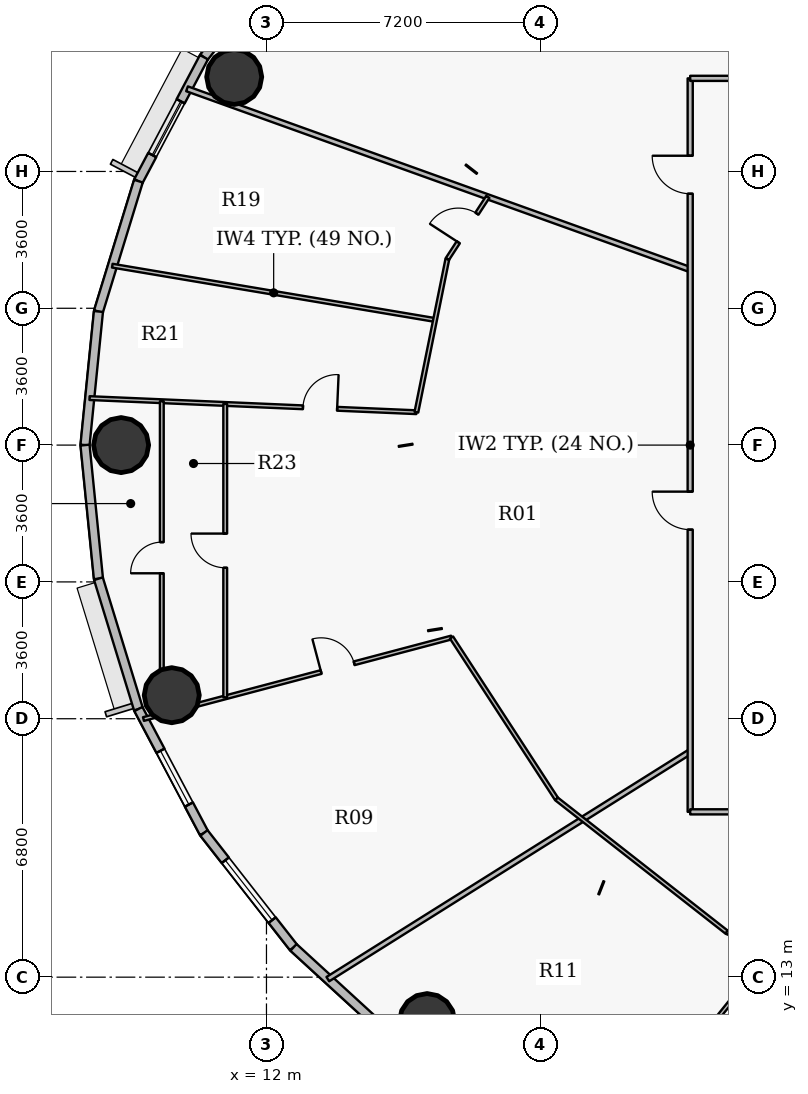
"""IFC4 building model, lengths in metres.
Left out: names, types, materials, properties, quantities, classifications, styles, units other than length and angle.
Written with IfcOpenShell. Run it as: python <this file> out.ifc"""

import sys

from ifc_helpers import new_model, si_unit, direction, frame, frame_2d, origin, origin_2d, place, context, subcontext, project, spatial, rectangle, hollow_circle, extrude, source, transform, mapped, element, fill, save


model = new_model("IFC4")
c1 = context("Model", 3, precision=1e-05, world=origin(), true_north=direction((0.0, 1.0)))
c2 = subcontext(c1, "Body", "Model", "MODEL_VIEW")
j1 = project(units=[si_unit("LENGTHUNIT", "METRE"), si_unit("PLANEANGLEUNIT", "RADIAN")], contexts=[c1])
p1 = place(None, origin())
s1 = spatial("IfcSite", under=j1, at=p1, CompositionType="ELEMENT")
p2 = place(p1, origin())
s2 = spatial("IfcBuilding", under=s1, at=p2, CompositionType="ELEMENT")
p3 = place(p2, frame((0.0, 0.0, 115.95)))
s3 = spatial("IfcBuildingStorey", under=s2, at=p3, CompositionType="ELEMENT", Elevation=115.95)
for number, where, z_axis, x_axis in (
    (1, (11.151, 36.688, 0.0), (0.0, 0.0, 1.0), (1.0, 0.0, 0.0)),
    (2, (8.175, 27.0, 0.0), (0.0, 0.0, 1.0), (1.0, 0.0, 0.0)),
    (3, (9.507, 20.419, 0.0), (0.0, 0.0, 1.0), (1.0, 0.0, 0.0)),
    (4, (16.227, 11.844, 0.0), (0.0, 0.0, 1.0), (1.0, 0.0, 0.0)),
):
    element("IfcColumn", number, at=place(p3, frame(where, z_axis=z_axis, x_axis=x_axis)), inside=s3, PredefinedType="COLUMN", context=c2, shape_type="SweptSolid", body=[
        extrude(hollow_circle(Radius=0.725, WallThickness=0.042, at=origin_2d()), origin(), (0.0, 0.0, 1.0), 3.75),
    ])
p4 = place(p3, frame((10.355, 37.206, 0.0), z_axis=(0.0, 0.0, 1.0), x_axis=(0.616272103517, 0.787533297345, 0.0)))
e5 = element("IfcWall", 5, at=p4, inside=s3, PredefinedType="SOLIDWALL", context=c2, shape_type="SweptSolid", body=[
    extrude(rectangle(XDim=3.823, YDim=0.24, at=frame_2d((1.912, 0.0))), origin(), (0.0, 0.0, 1.0), 3.5),
])
p5 = place(p3, frame((8.63, 33.945, 0.0), z_axis=(0.0, 0.0, 1.0), x_axis=(0.467614004126, 0.883932770716, 0.0)))
e6 = element("IfcWall", 6, at=p5, inside=s3, PredefinedType="SOLIDWALL", context=c2, shape_type="SweptSolid", body=[
    extrude(rectangle(XDim=3.689, YDim=0.24, at=frame_2d((1.844, 0.0))), origin(), (0.0, 0.0, 1.0), 3.5),
])
p6 = place(p5, frame((0.778, 0.0, 0.9)))
e7 = element("IfcOpeningElement", 7, at=p6, cuts=e6, PredefinedType="OPENING", context=c2, shape_type="SweptSolid", body=[
    extrude(rectangle(XDim=1.6, YDim=1.75, at=origin_2d()), frame((0.8, 0.13, 0.875), z_axis=(0.0, -1.0, 0.0), x_axis=(1.0, 0.0, 0.0)), (0.0, 0.0, 1.0), 0.26),
])
p7 = place(p3, frame((7.578, 30.515, 0.0), z_axis=(0.0, 0.0, 1.0), x_axis=(0.293124431344, 0.956074300329, 0.0)))
e8 = element("IfcWall", 8, at=p7, inside=s3, PredefinedType="SOLIDWALL", context=c2, shape_type="SweptSolid", body=[
    extrude(rectangle(XDim=3.587, YDim=0.24, at=frame_2d((1.793, 0.0))), origin(), (0.0, 0.0, 1.0), 3.5),
])
for number, where, z_axis, x_axis in (
    (9, (7.225, 27.0, 0.0), (0.0, 0.0, 1.0), (0.1, 0.995, 0.0)),
    (10, (7.578, 23.485, 0.0), (0.0, 0.0, 1.0), (-0.1, 0.995, 0.0)),
):
    element("IfcWall", number, at=place(p3, frame(where, z_axis=z_axis, x_axis=x_axis)), inside=s3, PredefinedType="SOLIDWALL", context=c2, shape_type="SweptSolid", body=[
        extrude(rectangle(XDim=3.533, YDim=0.24, at=frame_2d((1.767, 0.0))), origin(), (0.0, 0.0, 1.0), 3.5),
    ])
p8 = place(p3, frame((8.63, 20.055, 0.0), z_axis=(0.0, 0.0, 1.0), x_axis=(-0.293124431344, 0.956074300329, 0.0)))
e11 = element("IfcWall", 11, at=p8, inside=s3, PredefinedType="SOLIDWALL", context=c2, shape_type="SweptSolid", body=[
    extrude(rectangle(XDim=3.587, YDim=0.24, at=frame_2d((1.793, 0.0))), origin(), (0.0, 0.0, 1.0), 3.5),
])
p9 = place(p3, frame((10.355, 16.794, 0.0), z_axis=(0.0, 0.0, 1.0), x_axis=(-0.467614004126, 0.883932770716, 0.0)))
e12 = element("IfcWall", 12, at=p9, inside=s3, PredefinedType="SOLIDWALL", context=c2, shape_type="SweptSolid", body=[
    extrude(rectangle(XDim=3.689, YDim=0.24, at=frame_2d((1.844, 0.0))), origin(), (0.0, 0.0, 1.0), 3.5),
])
p10 = place(p9, frame((0.846, 0.0, 0.9)))
e13 = element("IfcOpeningElement", 13, at=p10, cuts=e12, PredefinedType="OPENING", context=c2, shape_type="SweptSolid", body=[
    extrude(rectangle(XDim=1.6, YDim=1.75, at=origin_2d()), frame((0.8, 0.13, 0.875), z_axis=(0.0, -1.0, 0.0), x_axis=(1.0, 0.0, 0.0)), (0.0, 0.0, 1.0), 0.26),
])
p11 = place(p3, frame((12.711, 13.783, 0.0), z_axis=(0.0, 0.0, 1.0), x_axis=(-0.616272103517, 0.787533297345, 0.0)))
e14 = element("IfcWall", 14, at=p11, inside=s3, PredefinedType="SOLIDWALL", context=c2, shape_type="SweptSolid", body=[
    extrude(rectangle(XDim=3.823, YDim=0.24, at=frame_2d((1.912, 0.0))), origin(), (0.0, 0.0, 1.0), 3.5),
])
p12 = place(p11, frame((0.912, 0.0, 0.9)))
e15 = element("IfcOpeningElement", 15, at=p12, cuts=e14, PredefinedType="OPENING", context=c2, shape_type="SweptSolid", body=[
    extrude(rectangle(XDim=2.0, YDim=1.75, at=origin_2d()), frame((1.0, 0.13, 0.875), z_axis=(0.0, -1.0, 0.0), x_axis=(1.0, 0.0, 0.0)), (0.0, 0.0, 1.0), 0.26),
])
p13 = place(p3, frame((15.642, 11.097, 0.0), z_axis=(0.0, 0.0, 1.0), x_axis=(-0.737113356241, 0.675769117414, 0.0)))
e16 = element("IfcWall", 16, at=p13, inside=s3, PredefinedType="SOLIDWALL", context=c2, shape_type="SweptSolid", body=[
    extrude(rectangle(XDim=3.976, YDim=0.24, at=frame_2d((1.988, 0.0))), origin(), (0.0, 0.0, 1.0), 3.5),
])
p14 = place(p3, frame((7.344, 28.236, 0.0), z_axis=(0.0, 0.0, 1.0), x_axis=(0.9990704445, -0.043107388317, 0.0)))
e17 = element("IfcWall", 17, at=p14, inside=s3, PredefinedType="PARTITIONING", context=c2, shape_type="SweptSolid", body=[
    extrude(rectangle(XDim=8.609, YDim=0.1, at=frame_2d((4.304, 0.0))), origin(), (0.0, 0.0, 1.0), 2.935),
])
p15 = place(p14, frame((5.621, 0.0, 0.0)))
e18 = element("IfcOpeningElement", 18, at=p15, cuts=e17, PredefinedType="OPENING", context=c2, shape_type="SweptSolid", body=[
    extrude(rectangle(XDim=0.9, YDim=2.1, at=origin_2d()), frame((0.45, 0.06, 1.05), z_axis=(0.0, -1.0, 0.0), x_axis=(1.0, 0.0, 0.0)), (0.0, 0.0, 1.0), 0.12),
])
p16 = place(p3, frame((7.943, 31.721, 0.0), z_axis=(0.0, 0.0, 1.0), x_axis=(0.986139151265, -0.165920385556, 0.0)))
e19 = element("IfcWall", 19, at=p16, inside=s3, PredefinedType="PARTITIONING", context=c2, shape_type="SweptSolid", body=[
    extrude(rectangle(XDim=8.612, YDim=0.1, at=frame_2d((4.306, 0.0))), origin(), (0.0, 0.0, 1.0), 2.935),
])
p17 = place(p3, frame((8.763, 19.792, 0.0), z_axis=(0.0, 0.0, 1.0), x_axis=(0.96671793708, 0.255844542893, 0.0)))
e20 = element("IfcWall", 20, at=p17, inside=s3, PredefinedType="PARTITIONING", context=c2, shape_type="SweptSolid", body=[
    extrude(rectangle(XDim=8.385, YDim=0.1, at=frame_2d((4.192, 0.0))), origin(), (0.0, 0.0, 1.0), 2.935),
])
p18 = place(p17, frame((4.835, 0.0, 0.0)))
e21 = element("IfcOpeningElement", 21, at=p18, cuts=e20, PredefinedType="OPENING", context=c2, shape_type="SweptSolid", body=[
    extrude(rectangle(XDim=0.9, YDim=2.1, at=origin_2d()), frame((0.45, 0.06, 1.05), z_axis=(0.0, -1.0, 0.0), x_axis=(1.0, 0.0, 0.0)), (0.0, 0.0, 1.0), 0.12),
])
p19 = place(p3, frame((9.246, 19.919, 0.0), z_axis=(0.0, 0.0, 1.0), x_axis=(0.0, 1.0, 0.0)))
e22 = element("IfcWall", 22, at=p19, inside=s3, PredefinedType="PARTITIONING", context=c2, shape_type="SweptSolid", body=[
    extrude(rectangle(XDim=8.235, YDim=0.1, at=frame_2d((4.117, 0.0))), origin(), (0.0, 0.0, 1.0), 2.935),
])
p20 = place(p19, frame((3.708, 0.0, 0.0)))
e23 = element("IfcOpeningElement", 23, at=p20, cuts=e22, PredefinedType="OPENING", context=c2, shape_type="SweptSolid", body=[
    extrude(rectangle(XDim=0.82, YDim=2.1, at=origin_2d()), frame((0.41, 0.06, 1.05), z_axis=(0.0, -1.0, 0.0), x_axis=(1.0, 0.0, 0.0)), (0.0, 0.0, 1.0), 0.12),
])
p21 = place(p3, frame((9.91, 36.375, 0.0), z_axis=(0.0, 0.0, 1.0), x_axis=(0.941089213164, -0.338158384292, 0.0)))
e24 = element("IfcWall", 24, at=p21, inside=s3, PredefinedType="PARTITIONING", context=c2, shape_type="SweptSolid", body=[
    extrude(rectangle(XDim=14.069, YDim=0.135, at=frame_2d((7.035, 0.0))), origin(), (0.0, 0.0, 1.0), 2.935),
])
p22 = place(p3, frame((10.915, 20.361, 0.0), z_axis=(0.0, 0.0, 1.0), x_axis=(0.0, 1.0, 0.0)))
e25 = element("IfcWall", 25, at=p22, inside=s3, PredefinedType="PARTITIONING", context=c2, shape_type="SweptSolid", body=[
    extrude(rectangle(XDim=7.721, YDim=0.1, at=frame_2d((3.861, 0.0))), origin(), (0.0, 0.0, 1.0), 2.935),
])
p23 = place(p22, frame((3.411, 0.0, 0.0)))
e26 = element("IfcOpeningElement", 26, at=p23, cuts=e25, PredefinedType="OPENING", context=c2, shape_type="SweptSolid", body=[
    extrude(rectangle(XDim=0.9, YDim=2.1, at=origin_2d()), frame((0.45, 0.06, 1.05), z_axis=(0.0, -1.0, 0.0), x_axis=(1.0, 0.0, 0.0)), (0.0, 0.0, 1.0), 0.12),
])
p24 = place(p3, frame((13.615, 12.948, 0.0), z_axis=(0.0, 0.0, 1.0), x_axis=(0.846963568038, 0.531650932866, 0.0)))
e27 = element("IfcWall", 27, at=p24, inside=s3, PredefinedType="PARTITIONING", context=c2, shape_type="SweptSolid", body=[
    extrude(rectangle(XDim=11.258, YDim=0.135, at=frame_2d((5.629, 0.0))), origin(), (0.0, 0.0, 1.0), 2.935),
])
p25 = place(p3, frame((15.945, 27.865, 0.0), z_axis=(0.0, 0.0, 1.0), x_axis=(0.198216891741, 0.980158183065, 0.0)))
e28 = element("IfcWall", 28, at=p25, inside=s3, PredefinedType="PARTITIONING", context=c2, shape_type="SweptSolid", body=[
    extrude(rectangle(XDim=4.111, YDim=0.1, at=frame_2d((2.056, 0.0))), origin(), (0.0, 0.0, 1.0), 3.5),
])
p26 = place(p3, frame((16.76, 31.895, 0.0), z_axis=(0.0, 0.0, 1.0), x_axis=(0.545370803514, 0.838194897786, 0.0)))
e29 = element("IfcWall", 29, at=p26, inside=s3, PredefinedType="PARTITIONING", context=c2, shape_type="SweptSolid", body=[
    extrude(rectangle(XDim=1.952, YDim=0.1, at=frame_2d((0.976, 0.0))), origin(), (0.0, 0.0, 1.0), 3.5),
])
p27 = place(p26, frame((0.526, 0.0, 0.0)))
e30 = element("IfcOpeningElement", 30, at=p27, cuts=e29, PredefinedType="OPENING", context=c2, shape_type="SweptSolid", body=[
    extrude(rectangle(XDim=0.9, YDim=2.1, at=origin_2d()), frame((0.45, 0.06, 1.05), z_axis=(0.0, -1.0, 0.0), x_axis=(1.0, 0.0, 0.0)), (0.0, 0.0, 1.0), 0.12),
])
p28 = place(p3, frame((16.869, 21.937, 0.0), z_axis=(0.0, 0.0, 1.0), x_axis=(0.545394651961, -0.838179380331, 0.0)))
e31 = element("IfcWall", 31, at=p28, inside=s3, PredefinedType="PARTITIONING", context=c2, shape_type="SweptSolid", body=[
    extrude(rectangle(XDim=5.068, YDim=0.1, at=frame_2d((2.534, 0.0))), origin(), (0.0, 0.0, 1.0), 3.5),
])
p29 = place(p3, frame((19.634, 17.689, 0.0), z_axis=(0.0, 0.0, 1.0), x_axis=(0.787333679705, -0.616527109544, 0.0)))
e32 = element("IfcWall", 32, at=p29, inside=s3, PredefinedType="PARTITIONING", context=c2, shape_type="SweptSolid", body=[
    extrude(rectangle(XDim=5.685, YDim=0.1, at=frame_2d((2.842, 0.0))), origin(), (0.0, 0.0, 1.0), 2.935),
])
p30 = place(p3, frame((20.717, 8.007, 0.0), z_axis=(0.0, 0.0, 1.0), x_axis=(0.626926430663, 0.779078462375, 0.0)))
e33 = element("IfcWall", 33, at=p30, inside=s3, PredefinedType="PARTITIONING", context=c2, shape_type="SweptSolid", body=[
    extrude(rectangle(XDim=7.317, YDim=0.1, at=frame_2d((3.658, 0.0))), origin(), (0.0, 0.0, 1.0), 2.935),
])
p31 = place(p30, frame((3.208, 0.0, 0.0)))
e34 = element("IfcOpeningElement", 34, at=p31, cuts=e33, PredefinedType="OPENING", context=c2, shape_type="SweptSolid", body=[
    extrude(rectangle(XDim=0.9, YDim=2.1, at=origin_2d()), frame((0.45, 0.06, 1.05), z_axis=(0.0, -1.0, 0.0), x_axis=(1.0, 0.0, 0.0)), (0.0, 0.0, 1.0), 0.12),
])
p32 = place(p3, frame((23.15, 17.35, 0.0), z_axis=(0.0, 0.0, 1.0), x_axis=(0.0, 1.0, 0.0)))
e35 = element("IfcWall", 35, at=p32, inside=s3, PredefinedType="PARTITIONING", context=c2, shape_type="SweptSolid", body=[
    extrude(rectangle(XDim=19.3, YDim=0.135, at=frame_2d((9.65, 0.0))), origin(), (0.0, 0.0, 1.0), 2.935),
])
p33 = place(p32, frame((16.264, 0.0, 0.0)))
e36 = element("IfcOpeningElement", 36, at=p33, cuts=e35, PredefinedType="OPENING", context=c2, shape_type="SweptSolid", body=[
    extrude(rectangle(XDim=1.0, YDim=2.15, at=origin_2d()), frame((0.5, 0.078, 1.075), z_axis=(0.0, -1.0, 0.0), x_axis=(1.0, 0.0, 0.0)), (0.0, 0.0, 1.0), 0.155),
])
p34 = place(p32, frame((7.426, 0.0, 0.0)))
e37 = element("IfcOpeningElement", 37, at=p34, cuts=e35, PredefinedType="OPENING", context=c2, shape_type="SweptSolid", body=[
    extrude(rectangle(XDim=1.0, YDim=2.15, at=origin_2d()), frame((0.5, 0.078, 1.075), z_axis=(0.0, -1.0, 0.0), x_axis=(1.0, 0.0, 0.0)), (0.0, 0.0, 1.0), 0.155),
])
p35 = place(p3, frame((23.15, 17.35, 0.0), z_axis=(0.0, 0.0, 1.0), x_axis=(1.0, 0.0, 0.0)))
e38 = element("IfcWall", 38, at=p35, inside=s3, PredefinedType="PARTITIONING", context=c2, shape_type="SweptSolid", body=[
    extrude(rectangle(XDim=10.619, YDim=0.135, at=frame_2d((5.31, 0.0))), origin(), (0.0, 0.0, 1.0), 2.935),
])
p36 = place(p35, frame((4.211, 0.0, 0.0)))
e39 = element("IfcOpeningElement", 39, at=p36, cuts=e38, PredefinedType="OPENING", context=c2, shape_type="SweptSolid", body=[
    extrude(rectangle(XDim=1.0, YDim=2.15, at=origin_2d()), frame((0.5, 0.078, 1.075), z_axis=(0.0, -1.0, 0.0), x_axis=(1.0, 0.0, 0.0)), (0.0, 0.0, 1.0), 0.155),
])
p37 = place(p3, frame((23.15, 36.65, 0.0), z_axis=(0.0, 0.0, 1.0), x_axis=(1.0, 0.0, 0.0)))
e40 = element("IfcWall", 40, at=p37, inside=s3, PredefinedType="PARTITIONING", context=c2, shape_type="SweptSolid", body=[
    extrude(rectangle(XDim=10.612, YDim=0.135, at=frame_2d((5.306, 0.0))), origin(), (0.0, 0.0, 1.0), 2.935),
])
p38 = place(p37, frame((8.182, 0.0, 0.0)))
e41 = element("IfcOpeningElement", 41, at=p38, cuts=e40, PredefinedType="OPENING", context=c2, shape_type="SweptSolid", body=[
    extrude(rectangle(XDim=1.0, YDim=2.15, at=origin_2d()), frame((0.5, 0.078, 1.075), z_axis=(0.0, -1.0, 0.0), x_axis=(1.0, 0.0, 0.0)), (0.0, 0.0, 1.0), 0.155),
])
p39 = place(p3, frame((23.33, 47.184, 0.0), z_axis=(0.0, 0.0, 1.0), x_axis=(0.531660079213, -0.846957826678, 0.0)))
e42 = element("IfcWall", 42, at=p39, inside=s3, PredefinedType="PARTITIONING", context=c2, shape_type="SweptSolid", body=[
    extrude(rectangle(XDim=12.437, YDim=0.135, at=frame_2d((6.219, 0.0))), origin(), (0.0, 0.0, 1.0), 2.935),
])
p40 = place(p3, frame((24.109, 14.184, 0.0), z_axis=(0.0, 0.0, 1.0), x_axis=(0.928816677888, -0.370539578017, 0.0)))
e43 = element("IfcWall", 43, at=p40, inside=s3, PredefinedType="PARTITIONING", context=c2, shape_type="SweptSolid", body=[
    extrude(rectangle(XDim=1.286, YDim=0.1, at=frame_2d((0.643, 0.0))), origin(), (0.0, 0.0, 1.0), 3.185),
])
m1 = source(origin(), c2, "Body", "SweptSolid", [
    extrude(rectangle(XDim=1.6, YDim=1.75, at=origin_2d()), frame((0.8, 0.03, 0.875), z_axis=(0.0, -1.0, 0.0), x_axis=(1.0, 0.0, 0.0)), (0.0, 0.0, 1.0), 0.06),
])
p41 = place(p6, origin())
e44 = element("IfcWindow", 44, at=p41, inside=s3, PartitioningType="DOUBLE_PANEL_VERTICAL", PredefinedType="WINDOW", context=c2, shape_type="MappedRepresentation", body=[
    mapped(m1, transform((0.0, 0.0, 0.0), x_axis=(1.0, 0.0, 0.0), y_axis=(0.0, 1.0, 0.0), z_axis=(0.0, 0.0, 1.0), scale=1.0)),
])
fill(e7, e44)
p42 = place(p10, origin())
e45 = element("IfcWindow", 45, at=p42, inside=s3, PartitioningType="DOUBLE_PANEL_VERTICAL", PredefinedType="WINDOW", context=c2, shape_type="MappedRepresentation", body=[
    mapped(m1, transform((0.0, 0.0, 0.0), x_axis=(1.0, 0.0, 0.0), y_axis=(0.0, 1.0, 0.0), z_axis=(0.0, 0.0, 1.0), scale=1.0)),
])
fill(e13, e45)
m2 = source(origin(), c2, "Body", "SweptSolid", [
    extrude(rectangle(XDim=2.0, YDim=1.75, at=origin_2d()), frame((1.0, 0.03, 0.875), z_axis=(0.0, -1.0, 0.0), x_axis=(1.0, 0.0, 0.0)), (0.0, 0.0, 1.0), 0.06),
])
p43 = place(p12, origin())
e46 = element("IfcWindow", 46, at=p43, inside=s3, PartitioningType="DOUBLE_PANEL_VERTICAL", PredefinedType="WINDOW", context=c2, shape_type="MappedRepresentation", body=[
    mapped(m2, transform((0.0, 0.0, 0.0), x_axis=(1.0, 0.0, 0.0), y_axis=(0.0, 1.0, 0.0), z_axis=(0.0, 0.0, 1.0), scale=1.0)),
])
fill(e15, e46)
m3 = source(origin(), c2, "Body", "SweptSolid", [
    extrude(rectangle(XDim=1.0, YDim=2.15, at=origin_2d()), frame((0.5, 0.025, 1.075), z_axis=(0.0, -1.0, 0.0), x_axis=(1.0, 0.0, 0.0)), (0.0, 0.0, 1.0), 0.05),
])
p44 = place(p33, origin())
e47 = element("IfcDoor", 47, at=p44, inside=s3, OperationType="SINGLE_SWING_RIGHT", PredefinedType="DOOR", context=c2, shape_type="MappedRepresentation", body=[
    mapped(m3, transform((0.0, 0.0, 0.0), x_axis=(1.0, 0.0, 0.0), y_axis=(0.0, 1.0, 0.0), z_axis=(0.0, 0.0, 1.0), scale=1.0)),
])
fill(e36, e47)
p45 = place(p34, origin())
e48 = element("IfcDoor", 48, at=p45, inside=s3, OperationType="SINGLE_SWING_RIGHT", PredefinedType="DOOR", context=c2, shape_type="MappedRepresentation", body=[
    mapped(m3, transform((0.0, 0.0, 0.0), x_axis=(1.0, 0.0, 0.0), y_axis=(0.0, 1.0, 0.0), z_axis=(0.0, 0.0, 1.0), scale=1.0)),
])
fill(e37, e48)
m4 = source(origin(), c2, "Body", "SweptSolid", [
    extrude(rectangle(XDim=0.9, YDim=2.1, at=origin_2d()), frame((0.45, 0.025, 1.05), z_axis=(0.0, -1.0, 0.0), x_axis=(1.0, 0.0, 0.0)), (0.0, 0.0, 1.0), 0.05),
])
p46 = place(p27, origin())
e49 = element("IfcDoor", 49, at=p46, inside=s3, OperationType="SINGLE_SWING_LEFT", PredefinedType="DOOR", context=c2, shape_type="MappedRepresentation", body=[
    mapped(m4, transform((0.0, 0.0, 0.0), x_axis=(1.0, 0.0, 0.0), y_axis=(0.0, 1.0, 0.0), z_axis=(0.0, 0.0, 1.0), scale=1.0)),
])
fill(e30, e49)
p47 = place(p15, origin())
e50 = element("IfcDoor", 50, at=p47, inside=s3, OperationType="SINGLE_SWING_RIGHT", PredefinedType="DOOR", context=c2, shape_type="MappedRepresentation", body=[
    mapped(m4, transform((0.0, 0.0, 0.0), x_axis=(1.0, 0.0, 0.0), y_axis=(0.0, 1.0, 0.0), z_axis=(0.0, 0.0, 1.0), scale=1.0)),
])
fill(e18, e50)
p48 = place(p18, origin())
e51 = element("IfcDoor", 51, at=p48, inside=s3, OperationType="SINGLE_SWING_LEFT", PredefinedType="DOOR", context=c2, shape_type="MappedRepresentation", body=[
    mapped(m4, transform((0.0, 0.0, 0.0), x_axis=(1.0, 0.0, 0.0), y_axis=(0.0, 1.0, 0.0), z_axis=(0.0, 0.0, 1.0), scale=1.0)),
])
fill(e21, e51)
p49 = place(p23, origin())
e52 = element("IfcDoor", 52, at=p49, inside=s3, OperationType="SINGLE_SWING_RIGHT", PredefinedType="DOOR", context=c2, shape_type="MappedRepresentation", body=[
    mapped(m4, transform((0.0, 0.0, 0.0), x_axis=(1.0, 0.0, 0.0), y_axis=(0.0, 1.0, 0.0), z_axis=(0.0, 0.0, 1.0), scale=1.0)),
])
fill(e26, e52)
m5 = source(origin(), c2, "Body", "SweptSolid", [
    extrude(rectangle(XDim=0.82, YDim=2.1, at=origin_2d()), frame((0.41, 0.025, 1.05), z_axis=(0.0, -1.0, 0.0), x_axis=(1.0, 0.0, 0.0)), (0.0, 0.0, 1.0), 0.05),
])
p50 = place(p20, origin())
e53 = element("IfcDoor", 53, at=p50, inside=s3, OperationType="SINGLE_SWING_LEFT", PredefinedType="DOOR", context=c2, shape_type="MappedRepresentation", body=[
    mapped(m5, transform((0.0, 0.0, 0.0), x_axis=(1.0, 0.0, 0.0), y_axis=(0.0, 1.0, 0.0), z_axis=(0.0, 0.0, 1.0), scale=1.0)),
])
fill(e23, e53)
save(model, sys.argv[1])
